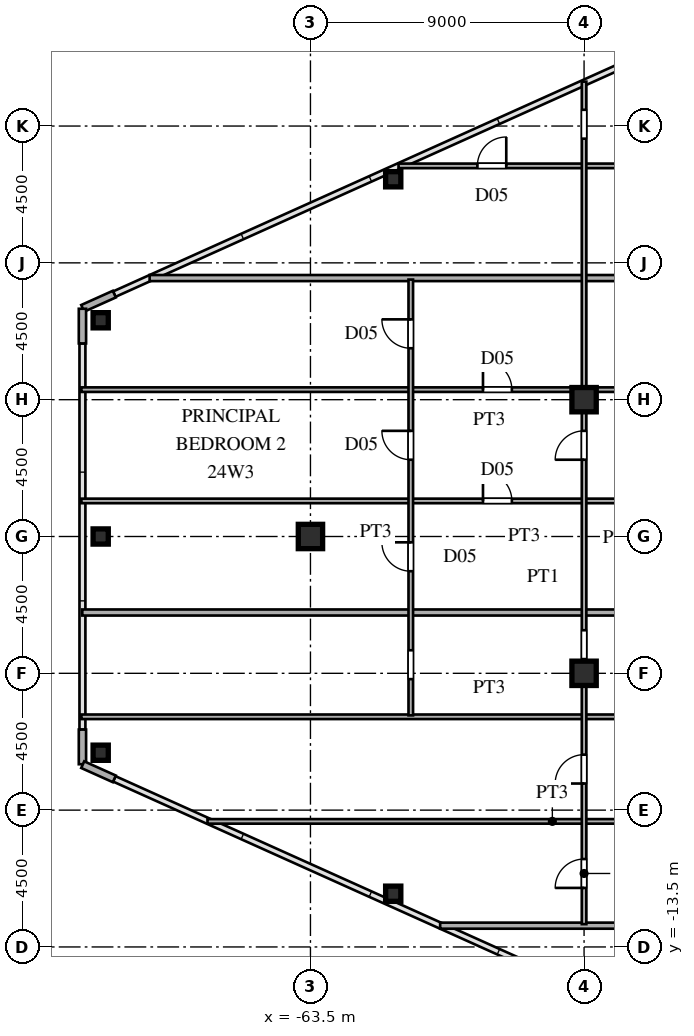
"""IFC4 building model, lengths in metres.
Left out: names, types, materials, properties, quantities, classifications, styles, units other than length and angle.
Written with IfcOpenShell. Run it as: python <this file> out.ifc"""

import sys

from ifc_helpers import new_model, si_unit, direction, frame, frame_2d, origin, origin_2d, place, context, subcontext, project, spatial, rectangle, hollow_rectangle, i_section, extrude, source, transform, mapped, element, fill, save


model = new_model("IFC4")
c1 = context("Model", 3, precision=1e-05, world=origin(), true_north=direction((0.0, 1.0)))
c2 = subcontext(c1, "Body", "Model", "MODEL_VIEW")
j1 = project(units=[si_unit("LENGTHUNIT", "METRE"), si_unit("PLANEANGLEUNIT", "RADIAN")], contexts=[c1])
p1 = place(None, origin())
s1 = spatial("IfcSite", under=j1, at=p1, CompositionType="ELEMENT")
p2 = place(p1, origin())
s2 = spatial("IfcBuilding", under=s1, at=p2, CompositionType="ELEMENT")
p3 = place(p2, frame((0.0, 0.0, 92.4)))
s3 = spatial("IfcBuildingStorey", under=s2, at=p3, CompositionType="ELEMENT", Elevation=92.4)
m1 = source(origin(), c2, "Body", "SweptSolid", [
    extrude(i_section(OverallWidth=0.8, OverallDepth=0.8, WebThickness=0.032, FlangeThickness=0.05, at=origin_2d()), origin(), (0.0, 0.0, 1.0), 3.6),
])
for number, where, z_axis, x_axis in (
    (1, (-54.5, -4.5, 0.0), (0.0, 0.0, 1.0), (1.0, 0.0, 0.0)),
    (2, (-54.5, 4.5, 0.0), (0.0, 0.0, 1.0), (1.0, 0.0, 0.0)),
    (3, (-63.5, 0.0, 0.0), (0.0, 0.0, 1.0), (1.0, 0.0, 0.0)),
):
    element("IfcColumn", number, at=place(p3, frame(where, z_axis=z_axis, x_axis=x_axis)), inside=s3, PredefinedType="COLUMN", context=c2, shape_type="MappedRepresentation", body=[
        mapped(m1, transform((0.0, 0.0, 0.0), scale=1.0)),
    ])
m2 = source(origin(), c2, "Body", "SweptSolid", [
    extrude(hollow_rectangle(XDim=0.5, YDim=0.5, WallThickness=0.02, at=origin_2d()), origin(), (0.0, 0.0, 1.0), 3.6),
])
for number, where, z_axis, x_axis in (
    (4, (-70.4, 7.112, 0.0), (0.0, 0.0, 1.0), (1.0, 0.0, 0.0)),
    (5, (-70.4, -7.112, 0.0), (0.0, 0.0, 1.0), (1.0, 0.0, 0.0)),
    (6, (-60.778, -11.749, 0.0), (0.0, 0.0, 1.0), (1.0, 0.0, 0.0)),
    (7, (-60.778, 11.749, 0.0), (0.0, 0.0, 1.0), (1.0, 0.0, 0.0)),
    (8, (-70.4, 0.0, 0.0), (0.0, 0.0, 1.0), (1.0, 0.0, 0.0)),
):
    element("IfcColumn", number, at=place(p3, frame(where, z_axis=z_axis, x_axis=x_axis)), inside=s3, PredefinedType="COLUMN", context=c2, shape_type="MappedRepresentation", body=[
        mapped(m2, transform((0.0, 0.0, 0.0), scale=1.0)),
    ])
for number, where, z_axis, x_axis in (
    (9, (-69.951, 7.972, 0.0), (0.0, 0.0, 1.0), (-0.912, -0.41, 0.0)),
    (10, (-71.0, 7.49, 0.0), (0.0, 0.0, 1.0), (0.0, -1.0, 0.0)),
    (11, (-71.0, -6.35, 0.0), (0.0, 0.0, 1.0), (0.0, -1.0, 0.0)),
    (12, (-70.991, -7.504, 0.0), (0.0, 0.0, 1.0), (0.912, -0.41, 0.0)),
):
    element("IfcWall", number, at=place(p3, frame(where, z_axis=z_axis, x_axis=x_axis)), inside=s3, PredefinedType="SOLIDWALL", context=c2, shape_type="SweptSolid", body=[
        extrude(rectangle(XDim=1.14, YDim=0.24, at=frame_2d((0.57, 0.0))), origin(), (0.0, 0.0, 1.0), 3.38),
    ])
p4 = place(p3, frame((-59.234, -12.8, 0.0), z_axis=(0.0, 0.0, 1.0), x_axis=(1.0, 0.0, 0.0)))
e13 = element("IfcWall", 13, at=p4, inside=s3, PredefinedType="PARTITIONING", context=c2, shape_type="SweptSolid", body=[
    extrude(rectangle(XDim=20.854, YDim=0.2, at=frame_2d((10.427, 0.0))), origin(), (0.0, 0.0, 1.0), 3.38),
])
p5 = place(p3, frame((-66.887, -9.37, 0.0), z_axis=(0.0, 0.0, 1.0), x_axis=(1.0, 0.0, 0.0)))
e14 = element("IfcWall", 14, at=p5, inside=s3, PredefinedType="PARTITIONING", context=c2, shape_type="SweptSolid", body=[
    extrude(rectangle(XDim=22.687, YDim=0.15, at=frame_2d((11.344, 0.0))), origin(), (0.0, 0.0, 1.0), 3.38),
])
p6 = place(p5, frame((17.087, 0.0, 0.0)))
e15 = element("IfcOpeningElement", 15, at=p6, cuts=e14, PredefinedType="OPENING", context=c2, shape_type="SweptSolid", body=[
    extrude(rectangle(XDim=0.95, YDim=2.15, at=frame_2d((0.475, 1.075))), frame((0.0, 0.085, 0.0), z_axis=(0.0, -1.0, 0.0), x_axis=(1.0, 0.0, 0.0)), (0.0, 0.0, 1.0), 0.17),
])
p7 = place(p3, frame((-71.035, -5.93, 0.0), z_axis=(0.0, 0.0, 1.0), x_axis=(1.0, 0.0, 0.0)))
e16 = element("IfcWall", 16, at=p7, inside=s3, PredefinedType="PARTITIONING", context=c2, shape_type="SweptSolid", body=[
    extrude(rectangle(XDim=26.835, YDim=0.15, at=frame_2d((13.417, 0.0))), origin(), (0.0, 0.0, 1.0), 3.38),
])
p8 = place(p7, frame((21.235, 0.0, 0.0)))
e17 = element("IfcOpeningElement", 17, at=p8, cuts=e16, PredefinedType="OPENING", context=c2, shape_type="SweptSolid", body=[
    extrude(rectangle(XDim=0.95, YDim=2.15, at=frame_2d((0.475, 1.075))), frame((0.0, 0.085, 0.0), z_axis=(0.0, -1.0, 0.0), x_axis=(1.0, 0.0, 0.0)), (0.0, 0.0, 1.0), 0.17),
])
p9 = place(p3, frame((-71.005, -2.5, 0.0), z_axis=(0.0, 0.0, 1.0), x_axis=(1.0, 0.0, 0.0)))
e18 = element("IfcWall", 18, at=p9, inside=s3, PredefinedType="PARTITIONING", context=c2, shape_type="SweptSolid", body=[
    extrude(rectangle(XDim=32.625, YDim=0.2, at=frame_2d((16.312, 0.0))), origin(), (0.0, 0.0, 1.0), 3.38),
])
p10 = place(p3, frame((-71.035, 1.17, 0.0), z_axis=(0.0, 0.0, 1.0), x_axis=(1.0, 0.0, 0.0)))
e19 = element("IfcWall", 19, at=p10, inside=s3, PredefinedType="PARTITIONING", context=c2, shape_type="SweptSolid", body=[
    extrude(rectangle(XDim=26.835, YDim=0.15, at=frame_2d((13.417, 0.0))), origin(), (0.0, 0.0, 1.0), 3.38),
])
p11 = place(p10, frame((21.235, 0.0, 0.0)))
e20 = element("IfcOpeningElement", 20, at=p11, cuts=e19, PredefinedType="OPENING", context=c2, shape_type="SweptSolid", body=[
    extrude(rectangle(XDim=0.95, YDim=2.15, at=frame_2d((0.475, 1.075))), frame((0.0, 0.085, 0.0), z_axis=(0.0, -1.0, 0.0), x_axis=(1.0, 0.0, 0.0)), (0.0, 0.0, 1.0), 0.17),
])
p12 = place(p10, frame((13.21, 0.0, 0.0)))
e21 = element("IfcOpeningElement", 21, at=p12, cuts=e19, PredefinedType="OPENING", context=c2, shape_type="SweptSolid", body=[
    extrude(rectangle(XDim=0.95, YDim=2.15, at=frame_2d((0.475, 1.075))), frame((0.0, 0.085, 0.0), z_axis=(0.0, -1.0, 0.0), x_axis=(1.0, 0.0, 0.0)), (0.0, 0.0, 1.0), 0.17),
])
p13 = place(p3, frame((-71.035, 4.83, 0.0), z_axis=(0.0, 0.0, 1.0), x_axis=(1.0, 0.0, 0.0)))
e22 = element("IfcWall", 22, at=p13, inside=s3, PredefinedType="PARTITIONING", context=c2, shape_type="SweptSolid", body=[
    extrude(rectangle(XDim=26.835, YDim=0.15, at=frame_2d((13.417, 0.0))), origin(), (0.0, 0.0, 1.0), 3.38),
])
p14 = place(p13, frame((21.235, 0.0, 0.0)))
e23 = element("IfcOpeningElement", 23, at=p14, cuts=e22, PredefinedType="OPENING", context=c2, shape_type="SweptSolid", body=[
    extrude(rectangle(XDim=0.95, YDim=2.15, at=frame_2d((0.475, 1.075))), frame((0.0, 0.085, 0.0), z_axis=(0.0, -1.0, 0.0), x_axis=(1.0, 0.0, 0.0)), (0.0, 0.0, 1.0), 0.17),
])
p15 = place(p13, frame((13.21, 0.0, 0.0)))
e24 = element("IfcOpeningElement", 24, at=p15, cuts=e22, PredefinedType="OPENING", context=c2, shape_type="SweptSolid", body=[
    extrude(rectangle(XDim=0.95, YDim=2.15, at=frame_2d((0.475, 1.075))), frame((0.0, 0.085, 0.0), z_axis=(0.0, -1.0, 0.0), x_axis=(1.0, 0.0, 0.0)), (0.0, 0.0, 1.0), 0.17),
])
p16 = place(p3, frame((-68.79, 8.5, 0.0), z_axis=(0.0, 0.0, 1.0), x_axis=(1.0, 0.0, 0.0)))
e25 = element("IfcWall", 25, at=p16, inside=s3, PredefinedType="PARTITIONING", context=c2, shape_type="SweptSolid", body=[
    extrude(rectangle(XDim=30.41, YDim=0.2, at=frame_2d((15.205, 0.0))), origin(), (0.0, 0.0, 1.0), 3.38),
])
p17 = place(p3, frame((-60.603, 12.19, 0.0), z_axis=(0.0, 0.0, 1.0), x_axis=(1.0, 0.0, 0.0)))
e26 = element("IfcWall", 26, at=p17, inside=s3, PredefinedType="PARTITIONING", context=c2, shape_type="SweptSolid", body=[
    extrude(rectangle(XDim=16.403, YDim=0.15, at=frame_2d((8.202, 0.0))), origin(), (0.0, 0.0, 1.0), 3.38),
])
p18 = place(p17, frame((10.803, 0.0, 0.0)))
e27 = element("IfcOpeningElement", 27, at=p18, cuts=e26, PredefinedType="OPENING", context=c2, shape_type="SweptSolid", body=[
    extrude(rectangle(XDim=0.95, YDim=2.15, at=frame_2d((0.475, 1.075))), frame((0.0, 0.085, 0.0), z_axis=(0.0, -1.0, 0.0), x_axis=(1.0, 0.0, 0.0)), (0.0, 0.0, 1.0), 0.17),
])
p19 = place(p17, frame((2.594, 0.0, 0.0)))
e28 = element("IfcOpeningElement", 28, at=p19, cuts=e26, PredefinedType="OPENING", context=c2, shape_type="SweptSolid", body=[
    extrude(rectangle(XDim=0.95, YDim=2.15, at=frame_2d((0.475, 1.075))), frame((0.0, 0.085, 0.0), z_axis=(0.0, -1.0, 0.0), x_axis=(1.0, 0.0, 0.0)), (0.0, 0.0, 1.0), 0.17),
])
p20 = place(p3, frame((-60.2, -5.883, 0.0), z_axis=(0.0, 0.0, 1.0), x_axis=(0.0, 1.0, 0.0)))
e29 = element("IfcWall", 29, at=p20, inside=s3, PredefinedType="PARTITIONING", context=c2, shape_type="SweptSolid", body=[
    extrude(rectangle(XDim=14.333, YDim=0.15, at=frame_2d((7.167, 0.0))), origin(), (0.0, 0.0, 1.0), 3.38),
])
p21 = place(p20, frame((1.191, 0.0, 0.0)))
e30 = element("IfcOpeningElement", 30, at=p21, cuts=e29, PredefinedType="OPENING", context=c2, shape_type="SweptSolid", body=[
    extrude(rectangle(XDim=0.95, YDim=2.15, at=frame_2d((0.475, 1.075))), frame((0.0, 0.085, 0.0), z_axis=(0.0, -1.0, 0.0), x_axis=(1.0, 0.0, 0.0)), (0.0, 0.0, 1.0), 0.17),
])
p22 = place(p20, frame((4.741, 0.0, 0.0)))
e31 = element("IfcOpeningElement", 31, at=p22, cuts=e29, PredefinedType="OPENING", context=c2, shape_type="SweptSolid", body=[
    extrude(rectangle(XDim=0.95, YDim=2.15, at=frame_2d((0.475, 1.075))), frame((0.0, 0.085, 0.0), z_axis=(0.0, -1.0, 0.0), x_axis=(1.0, 0.0, 0.0)), (0.0, 0.0, 1.0), 0.17),
])
p23 = place(p20, frame((8.408, 0.0, 0.0)))
e32 = element("IfcOpeningElement", 32, at=p23, cuts=e29, PredefinedType="OPENING", context=c2, shape_type="SweptSolid", body=[
    extrude(rectangle(XDim=0.95, YDim=2.15, at=frame_2d((0.475, 1.075))), frame((0.0, 0.085, 0.0), z_axis=(0.0, -1.0, 0.0), x_axis=(1.0, 0.0, 0.0)), (0.0, 0.0, 1.0), 0.17),
])
p24 = place(p20, frame((12.075, 0.0, 0.0)))
e33 = element("IfcOpeningElement", 33, at=p24, cuts=e29, PredefinedType="OPENING", context=c2, shape_type="SweptSolid", body=[
    extrude(rectangle(XDim=0.95, YDim=2.15, at=frame_2d((0.475, 1.075))), frame((0.0, 0.085, 0.0), z_axis=(0.0, -1.0, 0.0), x_axis=(1.0, 0.0, 0.0)), (0.0, 0.0, 1.0), 0.17),
])
p25 = place(p3, frame((-54.5, -12.75, 0.0), z_axis=(0.0, 0.0, 1.0), x_axis=(0.0, 1.0, 0.0)))
e34 = element("IfcWall", 34, at=p25, inside=s3, PredefinedType="PARTITIONING", context=c2, shape_type="SweptSolid", body=[
    extrude(rectangle(XDim=27.71, YDim=0.15, at=frame_2d((13.855, 0.0))), origin(), (0.0, 0.0, 1.0), 2.68),
])
p26 = place(p25, frame((4.625, 0.0, 0.0)))
e35 = element("IfcOpeningElement", 35, at=p26, cuts=e34, PredefinedType="OPENING", context=c2, shape_type="SweptSolid", body=[
    extrude(rectangle(XDim=0.95, YDim=2.15, at=frame_2d((0.475, 1.075))), frame((0.0, 0.085, 0.0), z_axis=(0.0, -1.0, 0.0), x_axis=(1.0, 0.0, 0.0)), (0.0, 0.0, 1.0), 0.17),
])
p27 = place(p25, frame((1.192, 0.0, 0.0)))
e36 = element("IfcOpeningElement", 36, at=p27, cuts=e34, PredefinedType="OPENING", context=c2, shape_type="SweptSolid", body=[
    extrude(rectangle(XDim=0.95, YDim=2.15, at=frame_2d((0.475, 1.075))), frame((0.0, 0.085, 0.0), z_axis=(0.0, -1.0, 0.0), x_axis=(1.0, 0.0, 0.0)), (0.0, 0.0, 1.0), 0.17),
])
p28 = place(p25, frame((8.717, 0.0, 0.0)))
e37 = element("IfcOpeningElement", 37, at=p28, cuts=e34, PredefinedType="OPENING", context=c2, shape_type="SweptSolid", body=[
    extrude(rectangle(XDim=0.95, YDim=2.15, at=frame_2d((0.475, 1.075))), frame((0.0, 0.085, 0.0), z_axis=(0.0, -1.0, 0.0), x_axis=(1.0, 0.0, 0.0)), (0.0, 0.0, 1.0), 0.17),
])
p29 = place(p25, frame((15.275, 0.0, 0.0)))
e38 = element("IfcOpeningElement", 38, at=p29, cuts=e34, PredefinedType="OPENING", context=c2, shape_type="SweptSolid", body=[
    extrude(rectangle(XDim=0.95, YDim=2.15, at=frame_2d((0.475, 1.075))), frame((0.0, 0.085, 0.0), z_axis=(0.0, -1.0, 0.0), x_axis=(1.0, 0.0, 0.0)), (0.0, 0.0, 1.0), 0.17),
])
p30 = place(p25, frame((25.835, 0.0, 0.0)))
e39 = element("IfcOpeningElement", 39, at=p30, cuts=e34, PredefinedType="OPENING", context=c2, shape_type="SweptSolid", body=[
    extrude(rectangle(XDim=0.95, YDim=2.15, at=frame_2d((0.475, 1.075))), frame((0.0, 0.085, 0.0), z_axis=(0.0, -1.0, 0.0), x_axis=(1.0, 0.0, 0.0)), (0.0, 0.0, 1.0), 0.17),
])
m3 = source(origin(), c2, "Body", "SweptSolid", [
    extrude(rectangle(XDim=0.95, YDim=2.15, at=frame_2d((0.475, 1.075))), frame((0.0, 0.025, 0.0), z_axis=(0.0, -1.0, 0.0), x_axis=(1.0, 0.0, 0.0)), (0.0, 0.0, 1.0), 0.05),
])
p31 = place(p12, origin())
e40 = element("IfcDoor", 40, at=p31, inside=s3, OperationType="SINGLE_SWING_LEFT", PredefinedType="DOOR", context=c2, shape_type="MappedRepresentation", body=[
    mapped(m3, transform((0.0, 0.0, 0.0), scale=1.0)),
])
fill(e21, e40)
p32 = place(p15, origin())
e41 = element("IfcDoor", 41, at=p32, inside=s3, OperationType="SINGLE_SWING_LEFT", PredefinedType="DOOR", context=c2, shape_type="MappedRepresentation", body=[
    mapped(m3, transform((0.0, 0.0, 0.0), scale=1.0)),
])
fill(e24, e41)
p33 = place(p19, origin())
e42 = element("IfcDoor", 42, at=p33, inside=s3, OperationType="SINGLE_SWING_RIGHT", PredefinedType="DOOR", context=c2, shape_type="MappedRepresentation", body=[
    mapped(m3, transform((0.0, 0.0, 0.0), scale=1.0)),
])
fill(e28, e42)
p34 = place(p22, origin())
e43 = element("IfcDoor", 43, at=p34, inside=s3, OperationType="SINGLE_SWING_RIGHT", PredefinedType="DOOR", context=c2, shape_type="MappedRepresentation", body=[
    mapped(m3, transform((0.0, 0.0, 0.0), scale=1.0)),
])
fill(e31, e43)
p35 = place(p23, origin())
e44 = element("IfcDoor", 44, at=p35, inside=s3, OperationType="SINGLE_SWING_RIGHT", PredefinedType="DOOR", context=c2, shape_type="MappedRepresentation", body=[
    mapped(m3, transform((0.0, 0.0, 0.0), scale=1.0)),
])
fill(e32, e44)
p36 = place(p24, origin())
e45 = element("IfcDoor", 45, at=p36, inside=s3, OperationType="SINGLE_SWING_RIGHT", PredefinedType="DOOR", context=c2, shape_type="MappedRepresentation", body=[
    mapped(m3, transform((0.0, 0.0, 0.0), scale=1.0)),
])
fill(e33, e45)
p37 = place(p26, origin())
e46 = element("IfcDoor", 46, at=p37, inside=s3, OperationType="SINGLE_SWING_LEFT", PredefinedType="DOOR", context=c2, shape_type="MappedRepresentation", body=[
    mapped(m3, transform((0.0, 0.0, 0.0), scale=1.0)),
])
fill(e35, e46)
p38 = place(p27, origin())
e47 = element("IfcDoor", 47, at=p38, inside=s3, OperationType="SINGLE_SWING_LEFT", PredefinedType="DOOR", context=c2, shape_type="MappedRepresentation", body=[
    mapped(m3, transform((0.0, 0.0, 0.0), scale=1.0)),
])
fill(e36, e47)
p39 = place(p29, origin())
e48 = element("IfcDoor", 48, at=p39, inside=s3, OperationType="SINGLE_SWING_LEFT", PredefinedType="DOOR", context=c2, shape_type="MappedRepresentation", body=[
    mapped(m3, transform((0.0, 0.0, 0.0), scale=1.0)),
])
fill(e38, e48)
save(model, sys.argv[1])
